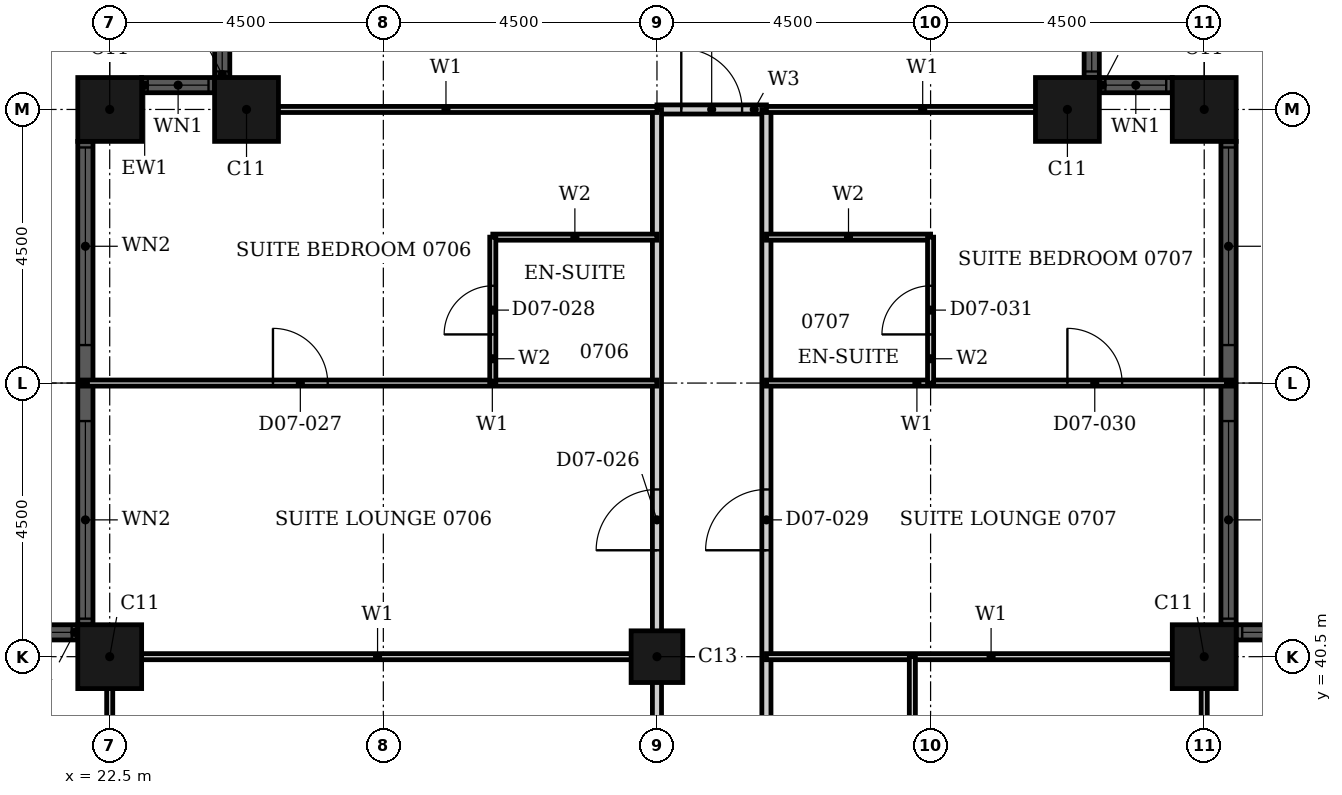
"""IFC4 building model, lengths in metres.
Left out: names, types, materials, properties, quantities, classifications, styles, units other than length and angle.
Written with IfcOpenShell. Run it as: python <this file> out.ifc"""

import sys

from ifc_helpers import new_model, si_unit, direction, frame, frame_2d, origin, origin_2d, place, context, subcontext, project, spatial, rectangle, hollow_rectangle, extrude, element, fill, save


model = new_model("IFC4")
c1 = context("Model", 3, precision=1e-05, world=origin(), true_north=direction((0.0, 1.0)))
c2 = subcontext(c1, "Body", "Model", "MODEL_VIEW")
j1 = project(units=[si_unit("LENGTHUNIT", "METRE"), si_unit("PLANEANGLEUNIT", "RADIAN")], contexts=[c1])
p1 = place(None, origin())
s1 = spatial("IfcSite", under=j1, at=p1, CompositionType="ELEMENT")
p2 = place(p1, origin())
s2 = spatial("IfcBuilding", under=s1, at=p2, CompositionType="ELEMENT")
p3 = place(p2, frame((0.0, 0.0, 37.2)))
s3 = spatial("IfcBuildingStorey", under=s2, at=p3, CompositionType="ELEMENT", Elevation=37.2)
for number, where, z_axis, x_axis in (
    (1, (40.5, 40.5, 0.0), (0.0, 0.0, 1.0), (1.0, 0.0, 0.0)),
    (2, (40.5, 49.5, 0.0), (0.0, 0.0, 1.0), (1.0, 0.0, 0.0)),
    (3, (38.25, 49.5, 0.0), (0.0, 0.0, 1.0), (1.0, 0.0, 0.0)),
    (4, (24.75, 49.5, 0.0), (0.0, 0.0, 1.0), (1.0, 0.0, 0.0)),
    (5, (22.5, 49.5, 0.0), (0.0, 0.0, 1.0), (1.0, 0.0, 0.0)),
    (6, (22.5, 40.5, 0.0), (0.0, 0.0, 1.0), (1.0, 0.0, 0.0)),
):
    element("IfcColumn", number, at=place(p3, frame(where, z_axis=z_axis, x_axis=x_axis)), inside=s3, PredefinedType="COLUMN", context=c2, shape_type="SweptSolid", body=[
        extrude(hollow_rectangle(XDim=1.05, YDim=1.05, WallThickness=0.034, at=origin_2d()), origin(), (0.0, 0.0, 1.0), 3.6),
    ])
p4 = place(p3, frame((31.5, 40.5, 0.0), z_axis=(0.0, 0.0, 1.0), x_axis=(1.0, 0.0, 0.0)))
e7 = element("IfcColumn", 7, at=p4, inside=s3, PredefinedType="COLUMN", context=c2, shape_type="SweptSolid", body=[
    extrude(hollow_rectangle(XDim=0.85, YDim=0.85, WallThickness=0.026, at=origin_2d()), origin(), (0.0, 0.0, 1.0), 3.6),
])
p5 = place(p3, frame((44.475, 40.9, 0.0), z_axis=(0.0, 0.0, 1.0), x_axis=(-1.0, 0.0, 0.0)))
e8 = element("IfcWall", 8, at=p5, inside=s3, PredefinedType="SOLIDWALL", context=c2, shape_type="SweptSolid", body=[
    extrude(rectangle(XDim=3.45, YDim=0.25, at=frame_2d((1.725, 0.0))), origin(), (0.0, 0.0, 1.0), 3.6),
])
p6 = place(p5, frame((0.1, 0.0, 0.9)))
e9 = element("IfcOpeningElement", 9, at=p6, cuts=e8, PredefinedType="OPENING", context=c2, shape_type="SweptSolid", body=[
    extrude(rectangle(XDim=3.25, YDim=2.08, at=frame_2d((1.625, 1.04))), frame((0.0, 0.135, 0.0), z_axis=(0.0, -1.0, 0.0), x_axis=(1.0, 0.0, 0.0)), (0.0, 0.0, 1.0), 0.27),
])
p7 = place(p3, frame((40.9, 41.025, 0.0), z_axis=(0.0, 0.0, 1.0), x_axis=(0.0, 1.0, 0.0)))
e10 = element("IfcWall", 10, at=p7, inside=s3, PredefinedType="SOLIDWALL", context=c2, shape_type="SweptSolid", body=[
    extrude(rectangle(XDim=7.95, YDim=0.25, at=frame_2d((3.975, 0.0))), origin(), (0.0, 0.0, 1.0), 3.6),
])
p8 = place(p7, frame((0.1, 0.0, 0.9)))
e11 = element("IfcOpeningElement", 11, at=p8, cuts=e10, PredefinedType="OPENING", context=c2, shape_type="SweptSolid", body=[
    extrude(rectangle(XDim=3.25, YDim=2.08, at=frame_2d((1.625, 1.04))), frame((0.0, 0.135, 0.0), z_axis=(0.0, -1.0, 0.0), x_axis=(1.0, 0.0, 0.0)), (0.0, 0.0, 1.0), 0.27),
])
p9 = place(p7, frame((4.6, 0.0, 0.9)))
e12 = element("IfcOpeningElement", 12, at=p9, cuts=e10, PredefinedType="OPENING", context=c2, shape_type="SweptSolid", body=[
    extrude(rectangle(XDim=3.25, YDim=2.08, at=frame_2d((1.625, 1.04))), frame((0.0, 0.135, 0.0), z_axis=(0.0, -1.0, 0.0), x_axis=(1.0, 0.0, 0.0)), (0.0, 0.0, 1.0), 0.27),
])
p10 = place(p3, frame((39.975, 49.9, 0.0), z_axis=(0.0, 0.0, 1.0), x_axis=(-1.0, 0.0, 0.0)))
e13 = element("IfcWall", 13, at=p10, inside=s3, PredefinedType="SOLIDWALL", context=c2, shape_type="SweptSolid", body=[
    extrude(rectangle(XDim=1.2, YDim=0.25, at=frame_2d((0.6, 0.0))), origin(), (0.0, 0.0, 1.0), 3.6),
])
p11 = place(p10, frame((0.1, 0.0, 0.9)))
e14 = element("IfcOpeningElement", 14, at=p11, cuts=e13, PredefinedType="OPENING", context=c2, shape_type="SweptSolid", body=[
    extrude(rectangle(XDim=1.0, YDim=2.08, at=frame_2d((0.5, 1.04))), frame((0.0, 0.135, 0.0), z_axis=(0.0, -1.0, 0.0), x_axis=(1.0, 0.0, 0.0)), (0.0, 0.0, 1.0), 0.27),
])
p12 = place(p3, frame((38.65, 50.025, 0.0), z_axis=(0.0, 0.0, 1.0), x_axis=(0.0, 1.0, 0.0)))
e15 = element("IfcWall", 15, at=p12, inside=s3, PredefinedType="SOLIDWALL", context=c2, shape_type="SweptSolid", body=[
    extrude(rectangle(XDim=1.2, YDim=0.25, at=frame_2d((0.6, 0.0))), origin(), (0.0, 0.0, 1.0), 3.6),
])
p13 = place(p12, frame((0.1, 0.0, 0.9)))
e16 = element("IfcOpeningElement", 16, at=p13, cuts=e15, PredefinedType="OPENING", context=c2, shape_type="SweptSolid", body=[
    extrude(rectangle(XDim=1.0, YDim=2.08, at=frame_2d((0.5, 1.04))), frame((0.0, 0.135, 0.0), z_axis=(0.0, -1.0, 0.0), x_axis=(1.0, 0.0, 0.0)), (0.0, 0.0, 1.0), 0.27),
])
p14 = place(p3, frame((24.35, 51.225, 0.0), z_axis=(0.0, 0.0, 1.0), x_axis=(0.0, -1.0, 0.0)))
e17 = element("IfcWall", 17, at=p14, inside=s3, PredefinedType="SOLIDWALL", context=c2, shape_type="SweptSolid", body=[
    extrude(rectangle(XDim=1.2, YDim=0.25, at=frame_2d((0.6, 0.0))), origin(), (0.0, 0.0, 1.0), 3.6),
])
p15 = place(p14, frame((0.1, 0.0, 0.9)))
e18 = element("IfcOpeningElement", 18, at=p15, cuts=e17, PredefinedType="OPENING", context=c2, shape_type="SweptSolid", body=[
    extrude(rectangle(XDim=1.0, YDim=2.08, at=frame_2d((0.5, 1.04))), frame((0.0, 0.135, 0.0), z_axis=(0.0, -1.0, 0.0), x_axis=(1.0, 0.0, 0.0)), (0.0, 0.0, 1.0), 0.27),
])
p16 = place(p3, frame((24.225, 49.9, 0.0), z_axis=(0.0, 0.0, 1.0), x_axis=(-1.0, 0.0, 0.0)))
e19 = element("IfcWall", 19, at=p16, inside=s3, PredefinedType="SOLIDWALL", context=c2, shape_type="SweptSolid", body=[
    extrude(rectangle(XDim=1.2, YDim=0.25, at=frame_2d((0.6, 0.0))), origin(), (0.0, 0.0, 1.0), 3.6),
])
p17 = place(p16, frame((0.1, 0.0, 0.9)))
e20 = element("IfcOpeningElement", 20, at=p17, cuts=e19, PredefinedType="OPENING", context=c2, shape_type="SweptSolid", body=[
    extrude(rectangle(XDim=1.0, YDim=2.08, at=frame_2d((0.5, 1.04))), frame((0.0, 0.135, 0.0), z_axis=(0.0, -1.0, 0.0), x_axis=(1.0, 0.0, 0.0)), (0.0, 0.0, 1.0), 0.27),
])
p18 = place(p3, frame((22.1, 48.975, 0.0), z_axis=(0.0, 0.0, 1.0), x_axis=(0.0, -1.0, 0.0)))
e21 = element("IfcWall", 21, at=p18, inside=s3, PredefinedType="SOLIDWALL", context=c2, shape_type="SweptSolid", body=[
    extrude(rectangle(XDim=7.95, YDim=0.25, at=frame_2d((3.975, 0.0))), origin(), (0.0, 0.0, 1.0), 3.6),
])
p19 = place(p18, frame((0.1, 0.0, 0.9)))
e22 = element("IfcOpeningElement", 22, at=p19, cuts=e21, PredefinedType="OPENING", context=c2, shape_type="SweptSolid", body=[
    extrude(rectangle(XDim=3.25, YDim=2.08, at=frame_2d((1.625, 1.04))), frame((0.0, 0.135, 0.0), z_axis=(0.0, -1.0, 0.0), x_axis=(1.0, 0.0, 0.0)), (0.0, 0.0, 1.0), 0.27),
])
p20 = place(p18, frame((4.6, 0.0, 0.9)))
e23 = element("IfcOpeningElement", 23, at=p20, cuts=e21, PredefinedType="OPENING", context=c2, shape_type="SweptSolid", body=[
    extrude(rectangle(XDim=3.25, YDim=2.08, at=frame_2d((1.625, 1.04))), frame((0.0, 0.135, 0.0), z_axis=(0.0, -1.0, 0.0), x_axis=(1.0, 0.0, 0.0)), (0.0, 0.0, 1.0), 0.27),
])
p21 = place(p3, frame((21.975, 40.9, 0.0), z_axis=(0.0, 0.0, 1.0), x_axis=(-1.0, 0.0, 0.0)))
e24 = element("IfcWall", 24, at=p21, inside=s3, PredefinedType="SOLIDWALL", context=c2, shape_type="SweptSolid", body=[
    extrude(rectangle(XDim=3.45, YDim=0.25, at=frame_2d((1.725, 0.0))), origin(), (0.0, 0.0, 1.0), 3.6),
])
p22 = place(p21, frame((0.1, 0.0, 0.9)))
e25 = element("IfcOpeningElement", 25, at=p22, cuts=e24, PredefinedType="OPENING", context=c2, shape_type="SweptSolid", body=[
    extrude(rectangle(XDim=3.25, YDim=2.08, at=frame_2d((1.625, 1.04))), frame((0.0, 0.135, 0.0), z_axis=(0.0, -1.0, 0.0), x_axis=(1.0, 0.0, 0.0)), (0.0, 0.0, 1.0), 0.27),
])
p23 = place(p3, frame((31.5, 49.5, 0.0), z_axis=(0.0, 0.0, 1.0), x_axis=(1.0, 0.0, 0.0)))
e26 = element("IfcWall", 26, at=p23, inside=s3, PredefinedType="PARTITIONING", context=c2, shape_type="SweptSolid", body=[
    extrude(rectangle(XDim=1.8, YDim=0.15, at=frame_2d((0.9, 0.0))), origin(), (0.0, 0.0, 1.0), 3.3),
])
p24 = place(p23, frame((0.4, 0.0, 0.0)))
e27 = element("IfcOpeningElement", 27, at=p24, cuts=e26, PredefinedType="OPENING", context=c2, shape_type="SweptSolid", body=[
    extrude(rectangle(XDim=1.0, YDim=2.1, at=frame_2d((0.5, 1.05))), frame((0.0, 0.085, 0.0), z_axis=(0.0, -1.0, 0.0), x_axis=(1.0, 0.0, 0.0)), (0.0, 0.0, 1.0), 0.17),
])
p25 = place(p3, frame((31.5, 33.3, 0.0), z_axis=(0.0, 0.0, 1.0), x_axis=(0.0, 1.0, 0.0)))
e28 = element("IfcWall", 28, at=p25, inside=s3, PredefinedType="PARTITIONING", context=c2, shape_type="SweptSolid", body=[
    extrude(rectangle(XDim=16.2, YDim=0.15, at=frame_2d((8.1, 0.0))), origin(), (0.0, 0.0, 1.0), 2.58),
])
p26 = place(p25, frame((8.95, 0.0, 0.0)))
e29 = element("IfcOpeningElement", 29, at=p26, cuts=e28, PredefinedType="OPENING", context=c2, shape_type="SweptSolid", body=[
    extrude(rectangle(XDim=1.0, YDim=2.1, at=frame_2d((0.5, 1.05))), frame((0.0, 0.085, 0.0), z_axis=(0.0, -1.0, 0.0), x_axis=(1.0, 0.0, 0.0)), (0.0, 0.0, 1.0), 0.17),
])
p27 = place(p3, frame((33.3, 33.3, 0.0), z_axis=(0.0, 0.0, 1.0), x_axis=(0.0, 1.0, 0.0)))
e30 = element("IfcWall", 30, at=p27, inside=s3, PredefinedType="PARTITIONING", context=c2, shape_type="SweptSolid", body=[
    extrude(rectangle(XDim=16.2, YDim=0.15, at=frame_2d((8.1, 0.0))), origin(), (0.0, 0.0, 1.0), 3.3),
])
p28 = place(p27, frame((8.95, 0.0, 0.0)))
e31 = element("IfcOpeningElement", 31, at=p28, cuts=e30, PredefinedType="OPENING", context=c2, shape_type="SweptSolid", body=[
    extrude(rectangle(XDim=1.0, YDim=2.1, at=frame_2d((0.5, 1.05))), frame((0.0, 0.085, 0.0), z_axis=(0.0, -1.0, 0.0), x_axis=(1.0, 0.0, 0.0)), (0.0, 0.0, 1.0), 0.17),
])
p29 = place(p3, frame((33.3, 40.5, 0.0), z_axis=(0.0, 0.0, 1.0), x_axis=(1.0, 0.0, 0.0)))
e32 = element("IfcWall", 32, at=p29, inside=s3, PredefinedType="PARTITIONING", context=c2, shape_type="SweptSolid", body=[
    extrude(rectangle(XDim=7.39, YDim=0.1, at=frame_2d((3.695, 0.0))), origin(), (0.0, 0.0, 1.0), 2.38),
])
p30 = place(p3, frame((22.31, 40.5, 0.0), z_axis=(0.0, 0.0, 1.0), x_axis=(1.0, 0.0, 0.0)))
e33 = element("IfcWall", 33, at=p30, inside=s3, PredefinedType="PARTITIONING", context=c2, shape_type="SweptSolid", body=[
    extrude(rectangle(XDim=9.19, YDim=0.1, at=frame_2d((4.595, 0.0))), origin(), (0.0, 0.0, 1.0), 2.38),
])
p31 = place(p3, frame((33.3, 45.0, 0.0), z_axis=(0.0, 0.0, 1.0), x_axis=(1.0, 0.0, 0.0)))
e34 = element("IfcWall", 34, at=p31, inside=s3, PredefinedType="PARTITIONING", context=c2, shape_type="SweptSolid", body=[
    extrude(rectangle(XDim=7.665, YDim=0.1, at=frame_2d((3.833, 0.0))), origin(), (0.0, 0.0, 1.0), 3.3),
])
p32 = place(p31, frame((4.95, 0.0, 0.0)))
e35 = element("IfcOpeningElement", 35, at=p32, cuts=e34, PredefinedType="OPENING", context=c2, shape_type="SweptSolid", body=[
    extrude(rectangle(XDim=0.9, YDim=2.1, at=frame_2d((0.45, 1.05))), frame((0.0, 0.06, 0.0), z_axis=(0.0, -1.0, 0.0), x_axis=(1.0, 0.0, 0.0)), (0.0, 0.0, 1.0), 0.12),
])
p33 = place(p3, frame((22.035, 45.0, 0.0), z_axis=(0.0, 0.0, 1.0), x_axis=(1.0, 0.0, 0.0)))
e36 = element("IfcWall", 36, at=p33, inside=s3, PredefinedType="PARTITIONING", context=c2, shape_type="SweptSolid", body=[
    extrude(rectangle(XDim=9.465, YDim=0.1, at=frame_2d((4.732, 0.0))), origin(), (0.0, 0.0, 1.0), 3.3),
])
p34 = place(p33, frame((3.15, 0.0, 0.0)))
e37 = element("IfcOpeningElement", 37, at=p34, cuts=e36, PredefinedType="OPENING", context=c2, shape_type="SweptSolid", body=[
    extrude(rectangle(XDim=0.9, YDim=2.1, at=frame_2d((0.45, 1.05))), frame((0.0, 0.06, 0.0), z_axis=(0.0, -1.0, 0.0), x_axis=(1.0, 0.0, 0.0)), (0.0, 0.0, 1.0), 0.12),
])
p35 = place(p3, frame((33.3, 49.5, 0.0), z_axis=(0.0, 0.0, 1.0), x_axis=(1.0, 0.0, 0.0)))
e38 = element("IfcWall", 38, at=p35, inside=s3, PredefinedType="PARTITIONING", context=c2, shape_type="SweptSolid", body=[
    extrude(rectangle(XDim=5.14, YDim=0.1, at=frame_2d((2.57, 0.0))), origin(), (0.0, 0.0, 1.0), 3.3),
])
p36 = place(p3, frame((24.56, 49.5, 0.0), z_axis=(0.0, 0.0, 1.0), x_axis=(1.0, 0.0, 0.0)))
e39 = element("IfcWall", 39, at=p36, inside=s3, PredefinedType="PARTITIONING", context=c2, shape_type="SweptSolid", body=[
    extrude(rectangle(XDim=6.94, YDim=0.1, at=frame_2d((3.47, 0.0))), origin(), (0.0, 0.0, 1.0), 3.3),
])
p37 = place(p3, frame((22.5, 33.3, 0.0), z_axis=(0.0, 0.0, 1.0), x_axis=(0.0, 1.0, 0.0)))
e40 = element("IfcWall", 40, at=p37, inside=s3, PredefinedType="PARTITIONING", context=c2, shape_type="SweptSolid", body=[
    extrude(rectangle(XDim=7.39, YDim=0.1, at=frame_2d((3.695, 0.0))), origin(), (0.0, 0.0, 1.0), 3.3),
])
p38 = place(p3, frame((35.7, 33.3, 0.0), z_axis=(0.0, 0.0, 1.0), x_axis=(0.0, 1.0, 0.0)))
e41 = element("IfcWall", 41, at=p38, inside=s3, PredefinedType="PARTITIONING", context=c2, shape_type="SweptSolid", body=[
    extrude(rectangle(XDim=7.2, YDim=0.1, at=frame_2d((3.6, 0.0))), origin(), (0.0, 0.0, 1.0), 3.3),
])
p39 = place(p3, frame((40.5, 33.3, 0.0), z_axis=(0.0, 0.0, 1.0), x_axis=(0.0, 1.0, 0.0)))
e42 = element("IfcWall", 42, at=p39, inside=s3, PredefinedType="PARTITIONING", context=c2, shape_type="SweptSolid", body=[
    extrude(rectangle(XDim=7.39, YDim=0.1, at=frame_2d((3.695, 0.0))), origin(), (0.0, 0.0, 1.0), 3.3),
])
for number, where, z_axis, x_axis in (
    (43, (33.3, 47.4, 0.0), (0.0, 0.0, 1.0), (1.0, 0.0, 0.0)),
    (44, (28.8, 47.4, 0.0), (0.0, 0.0, 1.0), (1.0, 0.0, 0.0)),
):
    element("IfcWall", number, at=place(p3, frame(where, z_axis=z_axis, x_axis=x_axis)), inside=s3, PredefinedType="PARTITIONING", context=c2, shape_type="SweptSolid", body=[
        extrude(rectangle(XDim=2.7, YDim=0.1, at=frame_2d((1.35, 0.0))), origin(), (0.0, 0.0, 1.0), 3.3),
    ])
p40 = place(p3, frame((28.8, 45.0, 0.0), z_axis=(0.0, 0.0, 1.0), x_axis=(0.0, 1.0, 0.0)))
e45 = element("IfcWall", 45, at=p40, inside=s3, PredefinedType="PARTITIONING", context=c2, shape_type="SweptSolid", body=[
    extrude(rectangle(XDim=2.4, YDim=0.1, at=frame_2d((1.2, 0.0))), origin(), (0.0, 0.0, 1.0), 3.3),
])
p41 = place(p40, frame((0.8, 0.0, 0.0)))
e46 = element("IfcOpeningElement", 46, at=p41, cuts=e45, PredefinedType="OPENING", context=c2, shape_type="SweptSolid", body=[
    extrude(rectangle(XDim=0.8, YDim=2.1, at=frame_2d((0.4, 1.05))), frame((0.0, 0.06, 0.0), z_axis=(0.0, -1.0, 0.0), x_axis=(1.0, 0.0, 0.0)), (0.0, 0.0, 1.0), 0.12),
])
p42 = place(p3, frame((36.0, 45.0, 0.0), z_axis=(0.0, 0.0, 1.0), x_axis=(0.0, 1.0, 0.0)))
e47 = element("IfcWall", 47, at=p42, inside=s3, PredefinedType="PARTITIONING", context=c2, shape_type="SweptSolid", body=[
    extrude(rectangle(XDim=2.4, YDim=0.1, at=frame_2d((1.2, 0.0))), origin(), (0.0, 0.0, 1.0), 2.58),
])
p43 = place(p42, frame((0.8, 0.0, 0.0)))
e48 = element("IfcOpeningElement", 48, at=p43, cuts=e47, PredefinedType="OPENING", context=c2, shape_type="SweptSolid", body=[
    extrude(rectangle(XDim=0.8, YDim=2.1, at=frame_2d((0.4, 1.05))), frame((0.0, 0.06, 0.0), z_axis=(0.0, -1.0, 0.0), x_axis=(1.0, 0.0, 0.0)), (0.0, 0.0, 1.0), 0.12),
])
p44 = place(p6, origin())
e49 = element("IfcWindow", 49, at=p44, inside=s3, PartitioningType="SINGLE_PANEL", PredefinedType="WINDOW", context=c2, shape_type="SweptSolid", body=[
    extrude(rectangle(XDim=3.25, YDim=2.08, at=frame_2d((1.625, 1.04))), frame((0.0, 0.03, 0.0), z_axis=(0.0, -1.0, 0.0), x_axis=(1.0, 0.0, 0.0)), (0.0, 0.0, 1.0), 0.06),
])
fill(e9, e49)
p45 = place(p8, origin())
e50 = element("IfcWindow", 50, at=p45, inside=s3, PartitioningType="SINGLE_PANEL", PredefinedType="WINDOW", context=c2, shape_type="SweptSolid", body=[
    extrude(rectangle(XDim=3.25, YDim=2.08, at=frame_2d((1.625, 1.04))), frame((0.0, 0.03, 0.0), z_axis=(0.0, -1.0, 0.0), x_axis=(1.0, 0.0, 0.0)), (0.0, 0.0, 1.0), 0.06),
])
fill(e11, e50)
p46 = place(p9, origin())
e51 = element("IfcWindow", 51, at=p46, inside=s3, PartitioningType="SINGLE_PANEL", PredefinedType="WINDOW", context=c2, shape_type="SweptSolid", body=[
    extrude(rectangle(XDim=3.25, YDim=2.08, at=frame_2d((1.625, 1.04))), frame((0.0, 0.03, 0.0), z_axis=(0.0, -1.0, 0.0), x_axis=(1.0, 0.0, 0.0)), (0.0, 0.0, 1.0), 0.06),
])
fill(e12, e51)
p47 = place(p11, origin())
e52 = element("IfcWindow", 52, at=p47, inside=s3, PartitioningType="SINGLE_PANEL", PredefinedType="WINDOW", context=c2, shape_type="SweptSolid", body=[
    extrude(rectangle(XDim=1.0, YDim=2.08, at=frame_2d((0.5, 1.04))), frame((0.0, 0.03, 0.0), z_axis=(0.0, -1.0, 0.0), x_axis=(1.0, 0.0, 0.0)), (0.0, 0.0, 1.0), 0.06),
])
fill(e14, e52)
p48 = place(p13, origin())
e53 = element("IfcWindow", 53, at=p48, inside=s3, PartitioningType="SINGLE_PANEL", PredefinedType="WINDOW", context=c2, shape_type="SweptSolid", body=[
    extrude(rectangle(XDim=1.0, YDim=2.08, at=frame_2d((0.5, 1.04))), frame((0.0, 0.03, 0.0), z_axis=(0.0, -1.0, 0.0), x_axis=(1.0, 0.0, 0.0)), (0.0, 0.0, 1.0), 0.06),
])
fill(e16, e53)
p49 = place(p15, origin())
e54 = element("IfcWindow", 54, at=p49, inside=s3, PartitioningType="SINGLE_PANEL", PredefinedType="WINDOW", context=c2, shape_type="SweptSolid", body=[
    extrude(rectangle(XDim=1.0, YDim=2.08, at=frame_2d((0.5, 1.04))), frame((0.0, 0.03, 0.0), z_axis=(0.0, -1.0, 0.0), x_axis=(1.0, 0.0, 0.0)), (0.0, 0.0, 1.0), 0.06),
])
fill(e18, e54)
p50 = place(p17, origin())
e55 = element("IfcWindow", 55, at=p50, inside=s3, PartitioningType="SINGLE_PANEL", PredefinedType="WINDOW", context=c2, shape_type="SweptSolid", body=[
    extrude(rectangle(XDim=1.0, YDim=2.08, at=frame_2d((0.5, 1.04))), frame((0.0, 0.03, 0.0), z_axis=(0.0, -1.0, 0.0), x_axis=(1.0, 0.0, 0.0)), (0.0, 0.0, 1.0), 0.06),
])
fill(e20, e55)
p51 = place(p19, origin())
e56 = element("IfcWindow", 56, at=p51, inside=s3, PartitioningType="SINGLE_PANEL", PredefinedType="WINDOW", context=c2, shape_type="SweptSolid", body=[
    extrude(rectangle(XDim=3.25, YDim=2.08, at=frame_2d((1.625, 1.04))), frame((0.0, 0.03, 0.0), z_axis=(0.0, -1.0, 0.0), x_axis=(1.0, 0.0, 0.0)), (0.0, 0.0, 1.0), 0.06),
])
fill(e22, e56)
p52 = place(p20, origin())
e57 = element("IfcWindow", 57, at=p52, inside=s3, PartitioningType="SINGLE_PANEL", PredefinedType="WINDOW", context=c2, shape_type="SweptSolid", body=[
    extrude(rectangle(XDim=3.25, YDim=2.08, at=frame_2d((1.625, 1.04))), frame((0.0, 0.03, 0.0), z_axis=(0.0, -1.0, 0.0), x_axis=(1.0, 0.0, 0.0)), (0.0, 0.0, 1.0), 0.06),
])
fill(e23, e57)
p53 = place(p22, origin())
e58 = element("IfcWindow", 58, at=p53, inside=s3, PartitioningType="SINGLE_PANEL", PredefinedType="WINDOW", context=c2, shape_type="SweptSolid", body=[
    extrude(rectangle(XDim=3.25, YDim=2.08, at=frame_2d((1.625, 1.04))), frame((0.0, 0.03, 0.0), z_axis=(0.0, -1.0, 0.0), x_axis=(1.0, 0.0, 0.0)), (0.0, 0.0, 1.0), 0.06),
])
fill(e25, e58)
p54 = place(p26, origin())
e59 = element("IfcDoor", 59, at=p54, inside=s3, OperationType="SINGLE_SWING_LEFT", PredefinedType="DOOR", context=c2, shape_type="SweptSolid", body=[
    extrude(rectangle(XDim=1.0, YDim=2.1, at=frame_2d((0.5, 1.05))), frame((0.0, 0.025, 0.0), z_axis=(0.0, -1.0, 0.0), x_axis=(1.0, 0.0, 0.0)), (0.0, 0.0, 1.0), 0.05),
])
fill(e29, e59)
p55 = place(p34, origin())
e60 = element("IfcDoor", 60, at=p55, inside=s3, OperationType="SINGLE_SWING_LEFT", PredefinedType="DOOR", context=c2, shape_type="SweptSolid", body=[
    extrude(rectangle(XDim=0.9, YDim=2.1, at=frame_2d((0.45, 1.05))), frame((0.0, 0.025, 0.0), z_axis=(0.0, -1.0, 0.0), x_axis=(1.0, 0.0, 0.0)), (0.0, 0.0, 1.0), 0.05),
])
fill(e37, e60)
p56 = place(p41, origin())
e61 = element("IfcDoor", 61, at=p56, inside=s3, OperationType="SINGLE_SWING_LEFT", PredefinedType="DOOR", context=c2, shape_type="SweptSolid", body=[
    extrude(rectangle(XDim=0.8, YDim=2.1, at=frame_2d((0.4, 1.05))), frame((0.0, 0.025, 0.0), z_axis=(0.0, -1.0, 0.0), x_axis=(1.0, 0.0, 0.0)), (0.0, 0.0, 1.0), 0.05),
])
fill(e46, e61)
p57 = place(p28, origin())
e62 = element("IfcDoor", 62, at=p57, inside=s3, OperationType="SINGLE_SWING_RIGHT", PredefinedType="DOOR", context=c2, shape_type="SweptSolid", body=[
    extrude(rectangle(XDim=1.0, YDim=2.1, at=frame_2d((0.5, 1.05))), frame((0.0, 0.025, 0.0), z_axis=(0.0, -1.0, 0.0), x_axis=(1.0, 0.0, 0.0)), (0.0, 0.0, 1.0), 0.05),
])
fill(e31, e62)
p58 = place(p32, origin())
e63 = element("IfcDoor", 63, at=p58, inside=s3, OperationType="SINGLE_SWING_RIGHT", PredefinedType="DOOR", context=c2, shape_type="SweptSolid", body=[
    extrude(rectangle(XDim=0.9, YDim=2.1, at=frame_2d((0.45, 1.05))), frame((0.0, 0.025, 0.0), z_axis=(0.0, -1.0, 0.0), x_axis=(1.0, 0.0, 0.0)), (0.0, 0.0, 1.0), 0.05),
])
fill(e35, e63)
p59 = place(p43, origin())
e64 = element("IfcDoor", 64, at=p59, inside=s3, OperationType="SINGLE_SWING_LEFT", PredefinedType="DOOR", context=c2, shape_type="SweptSolid", body=[
    extrude(rectangle(XDim=0.8, YDim=2.1, at=frame_2d((0.4, 1.05))), frame((0.0, 0.025, 0.0), z_axis=(0.0, -1.0, 0.0), x_axis=(1.0, 0.0, 0.0)), (0.0, 0.0, 1.0), 0.05),
])
fill(e48, e64)
p60 = place(p24, origin())
e65 = element("IfcDoor", 65, at=p60, inside=s3, OperationType="SINGLE_SWING_RIGHT", PredefinedType="DOOR", context=c2, shape_type="SweptSolid", body=[
    extrude(rectangle(XDim=1.0, YDim=2.1, at=frame_2d((0.5, 1.05))), frame((0.0, 0.025, 0.0), z_axis=(0.0, -1.0, 0.0), x_axis=(1.0, 0.0, 0.0)), (0.0, 0.0, 1.0), 0.05),
])
fill(e27, e65)
save(model, sys.argv[1])
